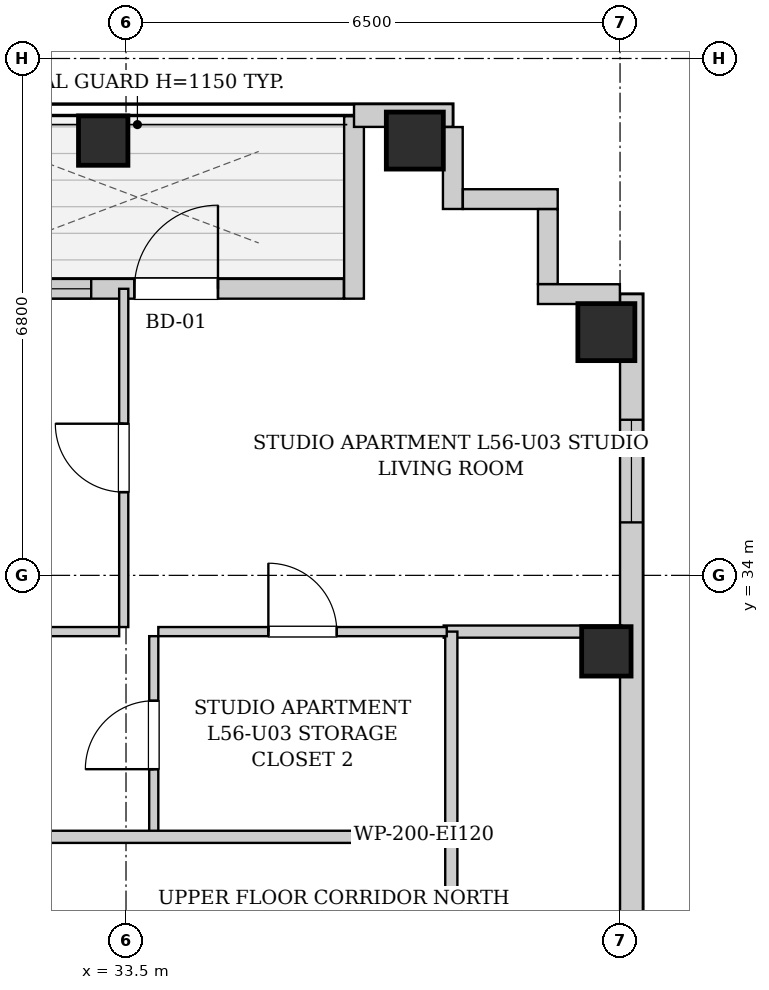
"""IFC4 building model, lengths in metres.
Left out: names, types, materials, properties, quantities, classifications, styles, units other than length and angle.
Written with IfcOpenShell. Run it as: python <this file> out.ifc"""

import sys

from ifc_helpers import new_model, si_unit, direction, frame, frame_2d, origin, origin_2d, place, context, subcontext, project, spatial, rectangle, extrude, element, fill, save


model = new_model("IFC4")
c1 = context("Model", 3, precision=1e-05, world=origin(), true_north=direction((0.0, 1.0)))
c2 = subcontext(c1, "Body", "Model", "MODEL_VIEW")
j1 = project(units=[si_unit("LENGTHUNIT", "METRE"), si_unit("PLANEANGLEUNIT", "RADIAN")], contexts=[c1])
p1 = place(None, origin())
s1 = spatial("IfcSite", under=j1, at=p1, CompositionType="ELEMENT")
p2 = place(p1, origin())
s2 = spatial("IfcBuilding", under=s1, at=p2, CompositionType="ELEMENT")
p3 = place(p2, frame((0.0, 0.0, 194.2)))
s3 = spatial("IfcBuildingStorey", under=s2, at=p3, CompositionType="ELEMENT", Elevation=194.2)
p4 = place(p3, frame((33.2, 39.72, 0.0), z_axis=(0.0, 0.0, 1.0), x_axis=(1.0, 0.0, 0.0)))
e1 = element("IfcColumn", 1, at=p4, inside=s3, PredefinedType="COLUMN", context=c2, shape_type="SweptSolid", body=[
    extrude(rectangle(XDim=0.65, YDim=0.65, at=origin_2d()), origin(), (0.0, 0.0, 1.0), 3.3),
])
p5 = place(p3, frame((37.3, 39.72, 0.0), z_axis=(0.0, 0.0, 1.0), x_axis=(1.0, 0.0, 0.0)))
e2 = element("IfcColumn", 2, at=p5, inside=s3, PredefinedType="COLUMN", context=c2, shape_type="SweptSolid", body=[
    extrude(rectangle(XDim=0.75, YDim=0.75, at=origin_2d()), origin(), (0.0, 0.0, 1.0), 3.3),
])
p6 = place(p3, frame((39.82, 33.0, 0.0), z_axis=(0.0, 0.0, 1.0), x_axis=(1.0, 0.0, 0.0)))
e3 = element("IfcColumn", 3, at=p6, inside=s3, PredefinedType="COLUMN", context=c2, shape_type="SweptSolid", body=[
    extrude(rectangle(XDim=0.65, YDim=0.65, at=origin_2d()), origin(), (0.0, 0.0, 1.0), 3.3),
])
p7 = place(p3, frame((39.82, 37.2, 0.0), z_axis=(0.0, 0.0, 1.0), x_axis=(1.0, 0.0, 0.0)))
e4 = element("IfcColumn", 4, at=p7, inside=s3, PredefinedType="COLUMN", context=c2, shape_type="SweptSolid", body=[
    extrude(rectangle(XDim=0.75, YDim=0.75, at=origin_2d()), origin(), (0.0, 0.0, 1.0), 3.3),
])
p8 = place(p3, frame((30.934, 37.77, 0.0), z_axis=(0.0, 0.0, 1.0), x_axis=(1.0, 0.0, 0.0)))
e5 = element("IfcWall", 5, at=p8, inside=s3, PredefinedType="SOLIDWALL", context=c2, shape_type="SweptSolid", body=[
    extrude(rectangle(XDim=5.432, YDim=0.26, at=frame_2d((2.716, 0.0))), origin(), (0.0, 0.0, 1.0), 3.04),
])
p9 = place(p8, frame((2.676, 0.0, 0.0)))
e6 = element("IfcOpeningElement", 6, at=p9, cuts=e5, PredefinedType="OPENING", context=c2, shape_type="SweptSolid", body=[
    extrude(rectangle(XDim=1.1, YDim=2.0, at=frame_2d((0.55, 1.0))), frame((0.0, 0.14, 0.0), z_axis=(0.0, -1.0, 0.0), x_axis=(1.0, 0.0, 0.0)), (0.0, 0.0, 1.0), 0.28),
])
p10 = place(p8, frame((0.758, 0.0, 0.55)))
e7 = element("IfcOpeningElement", 7, at=p10, cuts=e5, PredefinedType="OPENING", context=c2, shape_type="SweptSolid", body=[
    extrude(rectangle(XDim=1.35, YDim=1.2, at=frame_2d((0.675, 0.6))), frame((0.0, 0.14, 0.0), z_axis=(0.0, -1.0, 0.0), x_axis=(1.0, 0.0, 0.0)), (0.0, 0.0, 1.0), 0.28),
])
p11 = place(p3, frame((36.5, 37.64, 0.0), z_axis=(0.0, 0.0, 1.0), x_axis=(0.0, 1.0, 0.0)))
e8 = element("IfcWall", 8, at=p11, inside=s3, PredefinedType="SOLIDWALL", context=c2, shape_type="SweptSolid", body=[
    extrude(rectangle(XDim=2.4, YDim=0.26, at=frame_2d((1.2, 0.0))), origin(), (0.0, 0.0, 1.0), 3.04),
])
p12 = place(p3, frame((36.5, 40.05, 0.0), z_axis=(0.0, 0.0, 1.0), x_axis=(1.0, 0.0, 0.0)))
e9 = element("IfcWall", 9, at=p12, inside=s3, PredefinedType="SOLIDWALL", context=c2, shape_type="SweptSolid", body=[
    extrude(rectangle(XDim=1.3, YDim=0.3, at=frame_2d((0.65, 0.0))), origin(), (0.0, 0.0, 1.0), 3.04),
])
p13 = place(p3, frame((40.15, 37.7, 0.0), z_axis=(0.0, 0.0, 1.0), x_axis=(0.0, -1.0, 0.0)))
e10 = element("IfcWall", 10, at=p13, inside=s3, PredefinedType="SOLIDWALL", context=c2, shape_type="SweptSolid", body=[
    extrude(rectangle(XDim=31.4, YDim=0.3, at=frame_2d((15.7, 0.0))), origin(), (0.0, 0.0, 1.0), 3.04),
])
p14 = place(p13, frame((28.396, 0.0, 0.55)))
e11 = element("IfcOpeningElement", 11, at=p14, cuts=e10, PredefinedType="OPENING", context=c2, shape_type="SweptSolid", body=[
    extrude(rectangle(XDim=1.35, YDim=1.2, at=frame_2d((0.675, 0.6))), frame((0.0, 0.16, 0.0), z_axis=(0.0, -1.0, 0.0), x_axis=(1.0, 0.0, 0.0)), (0.0, 0.0, 1.0), 0.32),
])
p15 = place(p13, frame((1.653, 0.0, 0.55)))
e12 = element("IfcOpeningElement", 12, at=p15, cuts=e10, PredefinedType="OPENING", context=c2, shape_type="SweptSolid", body=[
    extrude(rectangle(XDim=1.35, YDim=1.2, at=frame_2d((0.675, 0.6))), frame((0.0, 0.16, 0.0), z_axis=(0.0, -1.0, 0.0), x_axis=(1.0, 0.0, 0.0)), (0.0, 0.0, 1.0), 0.32),
])
p16 = place(p13, frame((19.683, 0.0, 0.55)))
e13 = element("IfcOpeningElement", 13, at=p16, cuts=e10, PredefinedType="OPENING", context=c2, shape_type="SweptSolid", body=[
    extrude(rectangle(XDim=1.35, YDim=1.2, at=frame_2d((0.675, 0.6))), frame((0.0, 0.16, 0.0), z_axis=(0.0, -1.0, 0.0), x_axis=(1.0, 0.0, 0.0)), (0.0, 0.0, 1.0), 0.32),
])
p17 = place(p13, frame((10.367, 0.0, 0.55)))
e14 = element("IfcOpeningElement", 14, at=p17, cuts=e10, PredefinedType="OPENING", context=c2, shape_type="SweptSolid", body=[
    extrude(rectangle(XDim=1.35, YDim=1.2, at=frame_2d((0.675, 0.6))), frame((0.0, 0.16, 0.0), z_axis=(0.0, -1.0, 0.0), x_axis=(1.0, 0.0, 0.0)), (0.0, 0.0, 1.0), 0.32),
])
p18 = place(p3, frame((37.8, 39.898, 0.0), z_axis=(0.0, 0.0, 1.0), x_axis=(0.0, -1.0, 0.0)))
e15 = element("IfcWall", 15, at=p18, inside=s3, PredefinedType="SOLIDWALL", context=c2, shape_type="SweptSolid", body=[
    extrude(rectangle(XDim=1.078, YDim=0.26, at=frame_2d((0.539, 0.0))), origin(), (0.0, 0.0, 1.0), 3.04),
])
p19 = place(p3, frame((37.932, 38.95, 0.0), z_axis=(0.0, 0.0, 1.0), x_axis=(1.0, 0.0, 0.0)))
e16 = element("IfcWall", 16, at=p19, inside=s3, PredefinedType="SOLIDWALL", context=c2, shape_type="SweptSolid", body=[
    extrude(rectangle(XDim=1.248, YDim=0.26, at=frame_2d((0.624, 0.0))), origin(), (0.0, 0.0, 1.0), 3.04),
])
p20 = place(p3, frame((39.05, 38.818, 0.0), z_axis=(0.0, 0.0, 1.0), x_axis=(0.0, -1.0, 0.0)))
e17 = element("IfcWall", 17, at=p20, inside=s3, PredefinedType="SOLIDWALL", context=c2, shape_type="SweptSolid", body=[
    extrude(rectangle(XDim=0.986, YDim=0.26, at=frame_2d((0.493, 0.0))), origin(), (0.0, 0.0, 1.0), 3.04),
])
p21 = place(p3, frame((38.92, 37.7, 0.0), z_axis=(0.0, 0.0, 1.0), x_axis=(1.0, 0.0, 0.0)))
e18 = element("IfcWall", 18, at=p21, inside=s3, PredefinedType="SOLIDWALL", context=c2, shape_type="SweptSolid", body=[
    extrude(rectangle(XDim=1.078, YDim=0.26, at=frame_2d((0.539, 0.0))), origin(), (0.0, 0.0, 1.0), 3.04),
])
p22 = place(p3, frame((37.78, 28.98, 0.0), z_axis=(0.0, 0.0, 1.0), x_axis=(0.0, 1.0, 0.0)))
e19 = element("IfcWall", 19, at=p22, inside=s3, PredefinedType="PARTITIONING", context=c2, shape_type="SweptSolid", body=[
    extrude(rectangle(XDim=1.58, YDim=0.16, at=frame_2d((0.79, 0.0))), origin(), (0.0, 0.0, 1.0), 3.04),
])
p23 = place(p3, frame((37.68, 33.26, 0.0), z_axis=(0.0, 0.0, 1.0), x_axis=(1.0, 0.0, 0.0)))
e20 = element("IfcWall", 20, at=p23, inside=s3, PredefinedType="PARTITIONING", context=c2, shape_type="SweptSolid", body=[
    extrude(rectangle(XDim=2.34, YDim=0.16, at=frame_2d((1.17, 0.0))), origin(), (0.0, 0.0, 1.0), 3.04),
])
p24 = place(p3, frame((37.78, 30.6, 0.0), z_axis=(0.0, 0.0, 1.0), x_axis=(0.0, 1.0, 0.0)))
e21 = element("IfcWall", 21, at=p24, inside=s3, PredefinedType="PARTITIONING", context=c2, shape_type="SweptSolid", body=[
    extrude(rectangle(XDim=2.66, YDim=0.16, at=frame_2d((1.33, 0.0))), origin(), (0.0, 0.0, 1.0), 3.04),
])
p25 = place(p3, frame((33.865, 30.6, 0.0), z_axis=(0.0, 0.0, 1.0), x_axis=(0.0, 1.0, 0.0)))
e22 = element("IfcWall", 22, at=p25, inside=s3, PredefinedType="PARTITIONING", context=c2, shape_type="SweptSolid", body=[
    extrude(rectangle(XDim=2.6, YDim=0.12, at=frame_2d((1.3, 0.0))), origin(), (0.0, 0.0, 1.0), 3.04),
])
p26 = place(p25, frame((0.85, 0.0, 0.0)))
e23 = element("IfcOpeningElement", 23, at=p26, cuts=e22, PredefinedType="OPENING", context=c2, shape_type="SweptSolid", body=[
    extrude(rectangle(XDim=0.9, YDim=2.05, at=frame_2d((0.45, 1.025))), frame((0.0, 0.07, 0.0), z_axis=(0.0, -1.0, 0.0), x_axis=(1.0, 0.0, 0.0)), (0.0, 0.0, 1.0), 0.14),
])
p27 = place(p3, frame((30.31, 33.26, 0.0), z_axis=(0.0, 0.0, 1.0), x_axis=(1.0, 0.0, 0.0)))
e24 = element("IfcWall", 24, at=p27, inside=s3, PredefinedType="PARTITIONING", context=c2, shape_type="SweptSolid", body=[
    extrude(rectangle(XDim=3.1, YDim=0.12, at=frame_2d((1.55, 0.0))), origin(), (0.0, 0.0, 1.0), 3.04),
])
p28 = place(p27, frame((1.1, 0.0, 0.0)))
e25 = element("IfcOpeningElement", 25, at=p28, cuts=e24, PredefinedType="OPENING", context=c2, shape_type="SweptSolid", body=[
    extrude(rectangle(XDim=0.9, YDim=2.05, at=frame_2d((0.45, 1.025))), frame((0.0, 0.07, 0.0), z_axis=(0.0, -1.0, 0.0), x_axis=(1.0, 0.0, 0.0)), (0.0, 0.0, 1.0), 0.14),
])
p29 = place(p3, frame((33.925, 33.26, 0.0), z_axis=(0.0, 0.0, 1.0), x_axis=(1.0, 0.0, 0.0)))
e26 = element("IfcWall", 26, at=p29, inside=s3, PredefinedType="PARTITIONING", context=c2, shape_type="SweptSolid", body=[
    extrude(rectangle(XDim=3.795, YDim=0.12, at=frame_2d((1.897, 0.0))), origin(), (0.0, 0.0, 1.0), 3.04),
])
p30 = place(p29, frame((1.448, 0.0, 0.0)))
e27 = element("IfcOpeningElement", 27, at=p30, cuts=e26, PredefinedType="OPENING", context=c2, shape_type="SweptSolid", body=[
    extrude(rectangle(XDim=0.9, YDim=2.05, at=frame_2d((0.45, 1.025))), frame((0.0, 0.07, 0.0), z_axis=(0.0, -1.0, 0.0), x_axis=(1.0, 0.0, 0.0)), (0.0, 0.0, 1.0), 0.14),
])
p31 = place(p3, frame((33.47, 33.32, 0.0), z_axis=(0.0, 0.0, 1.0), x_axis=(0.0, 1.0, 0.0)))
e28 = element("IfcWall", 28, at=p31, inside=s3, PredefinedType="PARTITIONING", context=c2, shape_type="SweptSolid", body=[
    extrude(rectangle(XDim=4.45, YDim=0.12, at=frame_2d((2.225, 0.0))), origin(), (0.0, 0.0, 1.0), 3.04),
])
p32 = place(p31, frame((1.775, 0.0, 0.0)))
e29 = element("IfcOpeningElement", 29, at=p32, cuts=e28, PredefinedType="OPENING", context=c2, shape_type="SweptSolid", body=[
    extrude(rectangle(XDim=0.9, YDim=2.05, at=frame_2d((0.45, 1.025))), frame((0.0, 0.07, 0.0), z_axis=(0.0, -1.0, 0.0), x_axis=(1.0, 0.0, 0.0)), (0.0, 0.0, 1.0), 0.14),
])
p33 = place(p3, frame((13.15, 30.56, 0.0), z_axis=(0.0, 0.0, 1.0), x_axis=(1.0, 0.0, 0.0)))
e30 = element("IfcWall", 30, at=p33, inside=s3, PredefinedType="PARTITIONING", context=c2, shape_type="SweptSolid", body=[
    extrude(rectangle(XDim=24.6, YDim=0.16, at=frame_2d((12.3, 0.0))), origin(), (0.0, 0.0, 1.0), 3.04),
])
p34 = place(p33, frame((3.115, 0.0, 0.0)))
e31 = element("IfcOpeningElement", 31, at=p34, cuts=e30, PredefinedType="OPENING", context=c2, shape_type="SweptSolid", body=[
    extrude(rectangle(XDim=0.95, YDim=2.1, at=frame_2d((0.475, 1.05))), frame((0.0, 0.09, 0.0), z_axis=(0.0, -1.0, 0.0), x_axis=(1.0, 0.0, 0.0)), (0.0, 0.0, 1.0), 0.18),
])
p35 = place(p26, origin())
e32 = element("IfcDoor", 32, at=p35, inside=s3, OperationType="SINGLE_SWING_LEFT", PredefinedType="DOOR", context=c2, shape_type="SweptSolid", body=[
    extrude(rectangle(XDim=0.9, YDim=2.05, at=frame_2d((0.45, 1.025))), frame((0.0, 0.025, 0.0), z_axis=(0.0, -1.0, 0.0), x_axis=(1.0, 0.0, 0.0)), (0.0, 0.0, 1.0), 0.05),
])
fill(e23, e32)
p36 = place(p30, origin())
e33 = element("IfcDoor", 33, at=p36, inside=s3, OperationType="SINGLE_SWING_LEFT", PredefinedType="DOOR", context=c2, shape_type="SweptSolid", body=[
    extrude(rectangle(XDim=0.9, YDim=2.05, at=frame_2d((0.45, 1.025))), frame((0.0, 0.025, 0.0), z_axis=(0.0, -1.0, 0.0), x_axis=(1.0, 0.0, 0.0)), (0.0, 0.0, 1.0), 0.05),
])
fill(e27, e33)
p37 = place(p32, origin())
e34 = element("IfcDoor", 34, at=p37, inside=s3, OperationType="SINGLE_SWING_RIGHT", PredefinedType="DOOR", context=c2, shape_type="SweptSolid", body=[
    extrude(rectangle(XDim=0.9, YDim=2.05, at=frame_2d((0.45, 1.025))), frame((0.0, 0.025, 0.0), z_axis=(0.0, -1.0, 0.0), x_axis=(1.0, 0.0, 0.0)), (0.0, 0.0, 1.0), 0.05),
])
fill(e29, e34)
p38 = place(p9, origin())
e35 = element("IfcDoor", 35, at=p38, inside=s3, OperationType="SINGLE_SWING_RIGHT", PredefinedType="DOOR", context=c2, shape_type="SweptSolid", body=[
    extrude(rectangle(XDim=1.1, YDim=2.0, at=frame_2d((0.55, 1.0))), frame((0.0, 0.025, 0.0), z_axis=(0.0, -1.0, 0.0), x_axis=(1.0, 0.0, 0.0)), (0.0, 0.0, 1.0), 0.05),
])
fill(e6, e35)
p39 = place(p10, origin())
e36 = element("IfcWindow", 36, at=p39, inside=s3, PartitioningType="SINGLE_PANEL", PredefinedType="WINDOW", context=c2, shape_type="SweptSolid", body=[
    extrude(rectangle(XDim=1.35, YDim=1.2, at=frame_2d((0.675, 0.6))), frame((0.0, 0.03, 0.0), z_axis=(0.0, -1.0, 0.0), x_axis=(1.0, 0.0, 0.0)), (0.0, 0.0, 1.0), 0.06),
])
fill(e7, e36)
p40 = place(p15, origin())
e37 = element("IfcWindow", 37, at=p40, inside=s3, PartitioningType="SINGLE_PANEL", PredefinedType="WINDOW", context=c2, shape_type="SweptSolid", body=[
    extrude(rectangle(XDim=1.35, YDim=1.2, at=frame_2d((0.675, 0.6))), frame((0.0, 0.03, 0.0), z_axis=(0.0, -1.0, 0.0), x_axis=(1.0, 0.0, 0.0)), (0.0, 0.0, 1.0), 0.06),
])
fill(e12, e37)
save(model, sys.argv[1])
